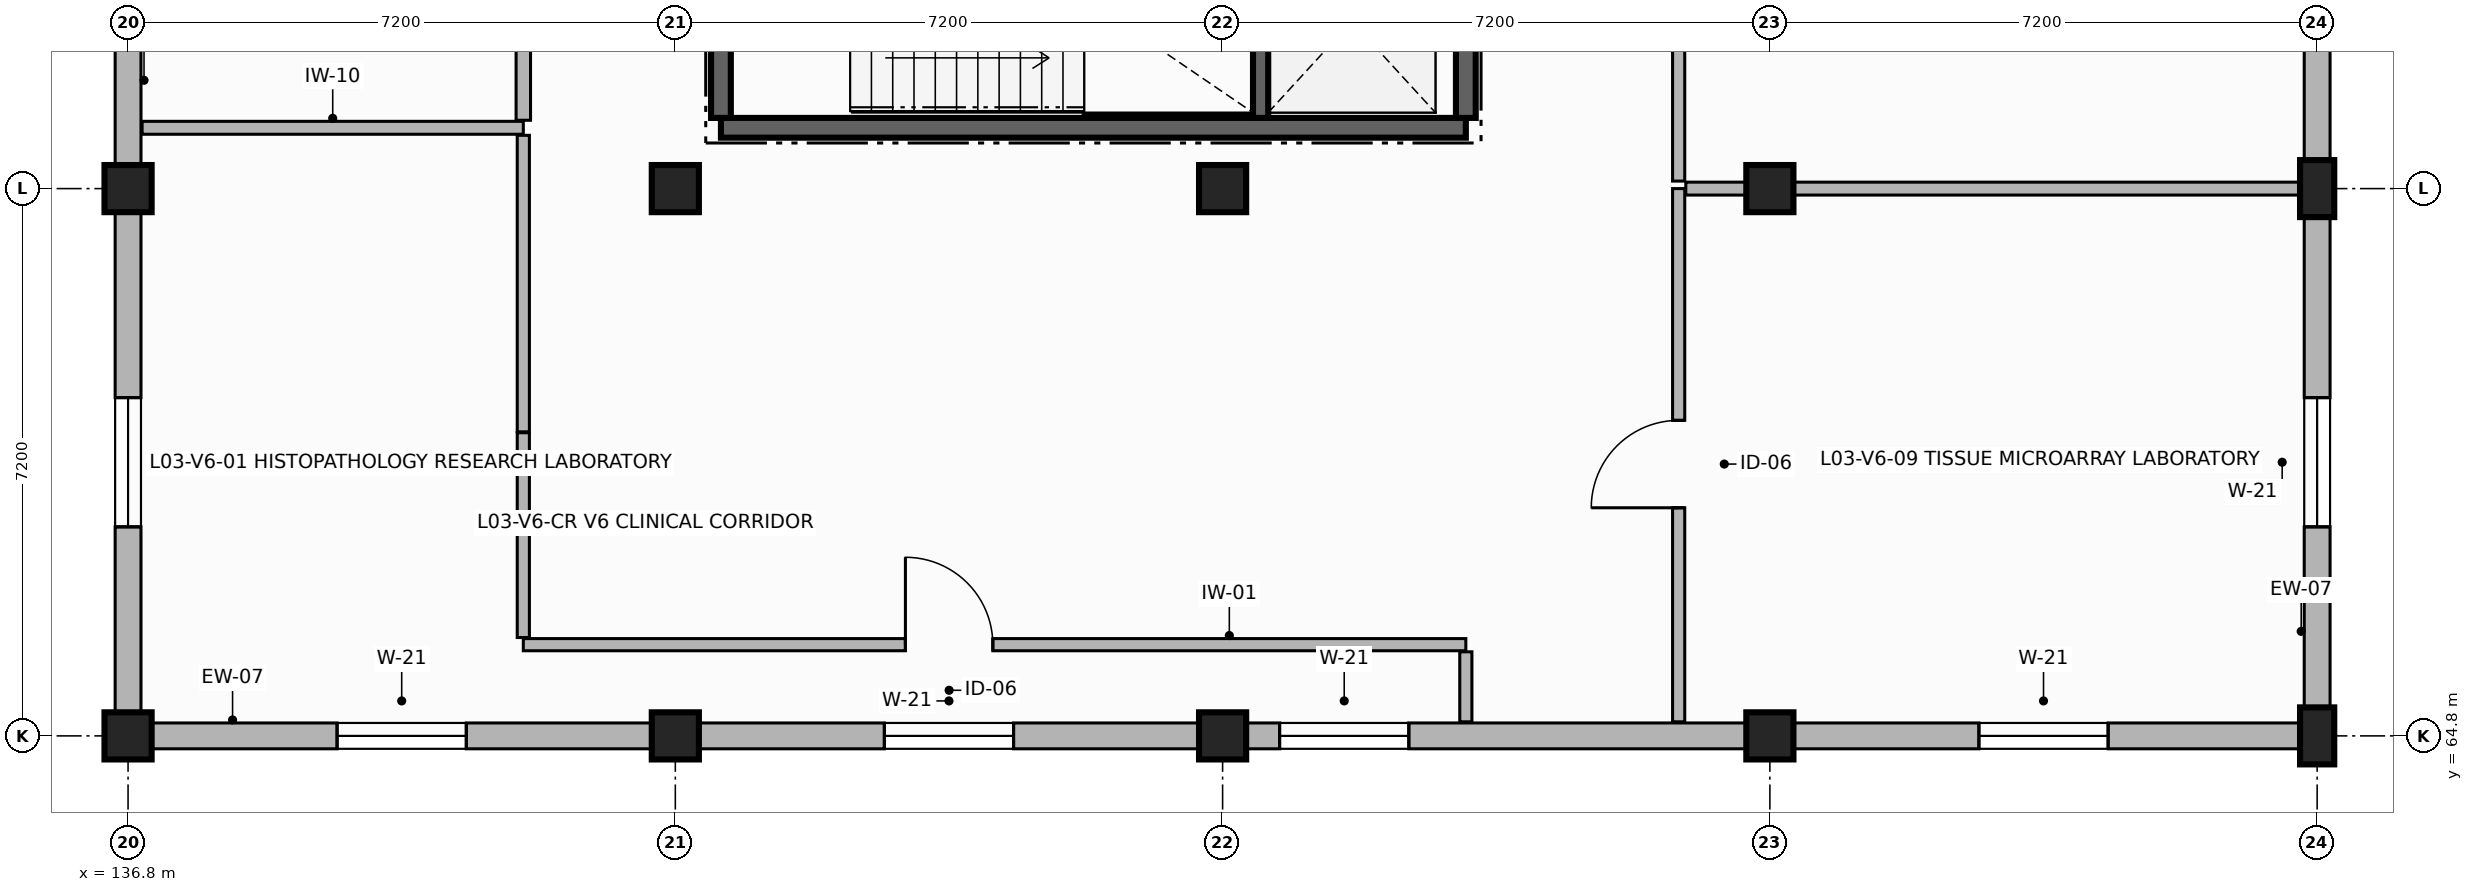
"""IFC4 building model, lengths in metres.
Left out: names, types, materials, properties, quantities, classifications, styles, units other than length and angle.
Written with IfcOpenShell. Run it as: python <this file> out.ifc"""

import sys

from ifc_helpers import new_model, si_unit, direction, frame, frame_2d, origin, origin_2d, place, context, subcontext, project, spatial, rectangle, extrude, element, fill, save


model = new_model("IFC4")
c1 = context("Model", 3, precision=1e-05, world=origin(), true_north=direction((0.0, 1.0)))
c2 = subcontext(c1, "Body", "Model", "MODEL_VIEW")
j1 = project(units=[si_unit("LENGTHUNIT", "METRE"), si_unit("PLANEANGLEUNIT", "RADIAN")], contexts=[c1])
p1 = place(None, origin())
s1 = spatial("IfcSite", under=j1, at=p1, CompositionType="ELEMENT")
p2 = place(p1, origin())
s2 = spatial("IfcBuilding", under=s1, at=p2, CompositionType="ELEMENT")
p3 = place(p2, frame((0.0, 0.0, 12.3)))
s3 = spatial("IfcBuildingStorey", under=s2, at=p3, CompositionType="ELEMENT", Elevation=12.3)
for number, where, z_axis, x_axis in (
    (1, (136.8, 64.8, 0.0), (0.0, 0.0, 1.0), (1.0, 0.0, 0.0)),
    (2, (136.8, 72.0, 0.0), (0.0, 0.0, 1.0), (1.0, 0.0, 0.0)),
    (3, (144.0, 64.8, 0.0), (0.0, 0.0, 1.0), (1.0, 0.0, 0.0)),
    (4, (144.0, 72.0, 0.0), (0.0, 0.0, 1.0), (1.0, 0.0, 0.0)),
    (5, (151.2, 64.8, 0.0), (0.0, 0.0, 1.0), (1.0, 0.0, 0.0)),
    (6, (151.2, 72.0, 0.0), (0.0, 0.0, 1.0), (1.0, 0.0, 0.0)),
    (7, (158.4, 64.8, 0.0), (0.0, 0.0, 1.0), (1.0, 0.0, 0.0)),
    (8, (158.4, 72.0, 0.0), (0.0, 0.0, 1.0), (1.0, 0.0, 0.0)),
):
    element("IfcColumn", number, at=place(p3, frame(where, z_axis=z_axis, x_axis=x_axis)), inside=s3, PredefinedType="COLUMN", context=c2, shape_type="SweptSolid", body=[
        extrude(rectangle(XDim=0.62, YDim=0.62, at=origin_2d()), origin(), (0.0, 0.0, 1.0), 3.38),
    ])
for number, where, z_axis, x_axis in (
    (9, (165.6, 64.8, 0.0), (0.0, 0.0, 1.0), (1.0, 0.0, 0.0)),
    (10, (165.6, 72.0, 0.0), (0.0, 0.0, 1.0), (1.0, 0.0, 0.0)),
):
    element("IfcColumn", number, at=place(p3, frame(where, z_axis=z_axis, x_axis=x_axis)), inside=s3, PredefinedType="PILASTER", context=c2, shape_type="SweptSolid", body=[
        extrude(rectangle(XDim=0.45, YDim=0.75, at=origin_2d()), origin(), (0.0, 0.0, 1.0), 3.38),
    ])
p4 = place(p3, frame((136.8, 64.8, 0.0), z_axis=(0.0, 0.0, 1.0), x_axis=(1.0, 0.0, 0.0)))
e11 = element("IfcWall", 11, at=p4, inside=s3, PredefinedType="SOLIDWALL", context=c2, shape_type="SweptSolid", body=[
    extrude(rectangle(XDim=7.2, YDim=0.34, at=frame_2d((3.6, 0.0))), origin(), (0.0, 0.0, 1.0), 2.71),
])
p5 = place(p4, frame((2.75, 0.0, 0.85)))
e12 = element("IfcOpeningElement", 12, at=p5, cuts=e11, PredefinedType="OPENING", context=c2, shape_type="SweptSolid", body=[
    extrude(rectangle(XDim=1.7, YDim=1.65, at=frame_2d((0.85, 0.825))), frame((0.0, 0.18, 0.0), z_axis=(0.0, -1.0, 0.0), x_axis=(1.0, 0.0, 0.0)), (0.0, 0.0, 1.0), 0.36),
])
p6 = place(p3, frame((144.0, 64.8, 0.0), z_axis=(0.0, 0.0, 1.0), x_axis=(1.0, 0.0, 0.0)))
e13 = element("IfcWall", 13, at=p6, inside=s3, PredefinedType="SOLIDWALL", context=c2, shape_type="SweptSolid", body=[
    extrude(rectangle(XDim=7.2, YDim=0.34, at=frame_2d((3.6, 0.0))), origin(), (0.0, 0.0, 1.0), 2.71),
])
p7 = place(p6, frame((2.75, 0.0, 0.85)))
e14 = element("IfcOpeningElement", 14, at=p7, cuts=e13, PredefinedType="OPENING", context=c2, shape_type="SweptSolid", body=[
    extrude(rectangle(XDim=1.7, YDim=1.65, at=frame_2d((0.85, 0.825))), frame((0.0, 0.18, 0.0), z_axis=(0.0, -1.0, 0.0), x_axis=(1.0, 0.0, 0.0)), (0.0, 0.0, 1.0), 0.36),
])
p8 = place(p3, frame((151.2, 64.8, 0.0), z_axis=(0.0, 0.0, 1.0), x_axis=(1.0, 0.0, 0.0)))
e15 = element("IfcWall", 15, at=p8, inside=s3, PredefinedType="SOLIDWALL", context=c2, shape_type="SweptSolid", body=[
    extrude(rectangle(XDim=7.2, YDim=0.34, at=frame_2d((3.6, 0.0))), origin(), (0.0, 0.0, 1.0), 2.71),
])
p9 = place(p8, frame((0.75, 0.0, 0.85)))
e16 = element("IfcOpeningElement", 16, at=p9, cuts=e15, PredefinedType="OPENING", context=c2, shape_type="SweptSolid", body=[
    extrude(rectangle(XDim=1.7, YDim=1.65, at=frame_2d((0.85, 0.825))), frame((0.0, 0.18, 0.0), z_axis=(0.0, -1.0, 0.0), x_axis=(1.0, 0.0, 0.0)), (0.0, 0.0, 1.0), 0.36),
])
p10 = place(p3, frame((158.4, 64.8, 0.0), z_axis=(0.0, 0.0, 1.0), x_axis=(1.0, 0.0, 0.0)))
e17 = element("IfcWall", 17, at=p10, inside=s3, PredefinedType="SOLIDWALL", context=c2, shape_type="SweptSolid", body=[
    extrude(rectangle(XDim=7.2, YDim=0.34, at=frame_2d((3.6, 0.0))), origin(), (0.0, 0.0, 1.0), 2.71),
])
p11 = place(p10, frame((2.75, 0.0, 0.85)))
e18 = element("IfcOpeningElement", 18, at=p11, cuts=e17, PredefinedType="OPENING", context=c2, shape_type="SweptSolid", body=[
    extrude(rectangle(XDim=1.7, YDim=1.65, at=frame_2d((0.85, 0.825))), frame((0.0, 0.18, 0.0), z_axis=(0.0, -1.0, 0.0), x_axis=(1.0, 0.0, 0.0)), (0.0, 0.0, 1.0), 0.36),
])
p12 = place(p3, frame((165.6, 64.8, 0.0), z_axis=(0.0, 0.0, 1.0), x_axis=(0.0, 1.0, 0.0)))
e19 = element("IfcWall", 19, at=p12, inside=s3, PredefinedType="SOLIDWALL", context=c2, shape_type="SweptSolid", body=[
    extrude(rectangle(XDim=7.2, YDim=0.34, at=frame_2d((3.6, 0.0))), origin(), (0.0, 0.0, 1.0), 2.71),
])
p13 = place(p12, frame((2.75, 0.0, 0.85)))
e20 = element("IfcOpeningElement", 20, at=p13, cuts=e19, PredefinedType="OPENING", context=c2, shape_type="SweptSolid", body=[
    extrude(rectangle(XDim=1.7, YDim=1.65, at=frame_2d((0.85, 0.825))), frame((0.0, 0.18, 0.0), z_axis=(0.0, -1.0, 0.0), x_axis=(1.0, 0.0, 0.0)), (0.0, 0.0, 1.0), 0.36),
])
p14 = place(p3, frame((165.6, 72.0, 0.0), z_axis=(0.0, 0.0, 1.0), x_axis=(0.0, 1.0, 0.0)))
e21 = element("IfcWall", 21, at=p14, inside=s3, PredefinedType="SOLIDWALL", context=c2, shape_type="SweptSolid", body=[
    extrude(rectangle(XDim=7.2, YDim=0.34, at=frame_2d((3.6, 0.0))), origin(), (0.0, 0.0, 1.0), 2.71),
])
p15 = place(p14, frame((2.75, 0.0, 0.85)))
e22 = element("IfcOpeningElement", 22, at=p15, cuts=e21, PredefinedType="OPENING", context=c2, shape_type="SweptSolid", body=[
    extrude(rectangle(XDim=1.7, YDim=1.65, at=frame_2d((0.85, 0.825))), frame((0.0, 0.18, 0.0), z_axis=(0.0, -1.0, 0.0), x_axis=(1.0, 0.0, 0.0)), (0.0, 0.0, 1.0), 0.36),
])
p16 = place(p3, frame((136.8, 79.2, 0.0), z_axis=(0.0, 0.0, 1.0), x_axis=(0.0, -1.0, 0.0)))
e23 = element("IfcWall", 23, at=p16, inside=s3, PredefinedType="SOLIDWALL", context=c2, shape_type="SweptSolid", body=[
    extrude(rectangle(XDim=7.2, YDim=0.34, at=frame_2d((3.6, 0.0))), origin(), (0.0, 0.0, 1.0), 2.71),
])
p17 = place(p16, frame((2.65, 0.0, 0.85)))
e24 = element("IfcOpeningElement", 24, at=p17, cuts=e23, PredefinedType="OPENING", context=c2, shape_type="SweptSolid", body=[
    extrude(rectangle(XDim=1.7, YDim=1.65, at=frame_2d((0.85, 0.825))), frame((0.0, 0.18, 0.0), z_axis=(0.0, -1.0, 0.0), x_axis=(1.0, 0.0, 0.0)), (0.0, 0.0, 1.0), 0.36),
])
p18 = place(p3, frame((136.8, 72.0, 0.0), z_axis=(0.0, 0.0, 1.0), x_axis=(0.0, -1.0, 0.0)))
e25 = element("IfcWall", 25, at=p18, inside=s3, PredefinedType="SOLIDWALL", context=c2, shape_type="SweptSolid", body=[
    extrude(rectangle(XDim=7.2, YDim=0.34, at=frame_2d((3.6, 0.0))), origin(), (0.0, 0.0, 1.0), 2.71),
])
p19 = place(p18, frame((2.75, 0.0, 0.85)))
e26 = element("IfcOpeningElement", 26, at=p19, cuts=e25, PredefinedType="OPENING", context=c2, shape_type="SweptSolid", body=[
    extrude(rectangle(XDim=1.7, YDim=1.65, at=frame_2d((0.85, 0.825))), frame((0.0, 0.18, 0.0), z_axis=(0.0, -1.0, 0.0), x_axis=(1.0, 0.0, 0.0)), (0.0, 0.0, 1.0), 0.36),
])
p20 = place(p3, frame((144.6, 72.8, 0.0), z_axis=(0.0, 0.0, 1.0), x_axis=(1.0, 0.0, 0.0)))
e27 = element("IfcWall", 27, at=p20, inside=s3, PredefinedType="SHEAR", context=c2, shape_type="SweptSolid", body=[
    extrude(rectangle(XDim=9.8, YDim=0.26, at=frame_2d((4.9, 0.0))), origin(), (0.0, 0.0, 1.0), 3.38),
])
p21 = place(p3, frame((154.4, 72.93, 0.0), z_axis=(0.0, 0.0, 1.0), x_axis=(0.0, 1.0, 0.0)))
e28 = element("IfcWall", 28, at=p21, inside=s3, PredefinedType="SHEAR", context=c2, shape_type="SweptSolid", body=[
    extrude(rectangle(XDim=5.54, YDim=0.26, at=frame_2d((2.77, 0.0))), origin(), (0.0, 0.0, 1.0), 3.38),
])
p22 = place(p21, frame((4.07, 0.0, 0.0)))
e29 = element("IfcOpeningElement", 29, at=p22, cuts=e28, PredefinedType="OPENING", context=c2, shape_type="SweptSolid", body=[
    extrude(rectangle(XDim=1.15, YDim=2.2, at=frame_2d((0.575, 1.1))), frame((0.0, 0.14, 0.0), z_axis=(0.0, -1.0, 0.0), x_axis=(1.0, 0.0, 0.0)), (0.0, 0.0, 1.0), 0.28),
])
p23 = place(p3, frame((144.6, 78.47, 0.0), z_axis=(0.0, 0.0, 1.0), x_axis=(0.0, -1.0, 0.0)))
e30 = element("IfcWall", 30, at=p23, inside=s3, PredefinedType="SHEAR", context=c2, shape_type="SweptSolid", body=[
    extrude(rectangle(XDim=5.54, YDim=0.26, at=frame_2d((2.77, 0.0))), origin(), (0.0, 0.0, 1.0), 3.38),
])
p24 = place(p3, frame((151.7, 72.93, 0.0), z_axis=(0.0, 0.0, 1.0), x_axis=(0.0, 1.0, 0.0)))
e31 = element("IfcWall", 31, at=p24, inside=s3, PredefinedType="SHEAR", context=c2, shape_type="SweptSolid", body=[
    extrude(rectangle(XDim=3.67, YDim=0.2, at=frame_2d((1.835, 0.0))), origin(), (0.0, 0.0, 1.0), 3.38),
])
p25 = place(p3, frame((142.0, 66.0, 0.0), z_axis=(0.0, 0.0, 1.0), x_axis=(1.0, 0.0, 0.0)))
e32 = element("IfcWall", 32, at=p25, inside=s3, PredefinedType="PARTITIONING", context=c2, shape_type="SweptSolid", body=[
    extrude(rectangle(XDim=12.4, YDim=0.16, at=frame_2d((6.2, 0.0))), origin(), (0.0, 0.0, 1.0), 2.69),
])
p26 = place(p25, frame((5.027, 0.0, 0.0)))
e33 = element("IfcOpeningElement", 33, at=p26, cuts=e32, PredefinedType="OPENING", context=c2, shape_type="SweptSolid", body=[
    extrude(rectangle(XDim=1.15, YDim=2.25, at=frame_2d((0.575, 1.125))), frame((0.0, 0.09, 0.0), z_axis=(0.0, -1.0, 0.0), x_axis=(1.0, 0.0, 0.0)), (0.0, 0.0, 1.0), 0.18),
])
p27 = place(p3, frame((154.4, 65.906, 0.0), z_axis=(0.0, 0.0, 1.0), x_axis=(0.0, -1.0, 0.0)))
e34 = element("IfcWall", 34, at=p27, inside=s3, PredefinedType="PARTITIONING", context=c2, shape_type="SweptSolid", body=[
    extrude(rectangle(XDim=0.921, YDim=0.16, at=frame_2d((0.46, 0.0))), origin(), (0.0, 0.0, 1.0), 2.69),
])
p28 = place(p3, frame((136.985, 72.8, 0.0), z_axis=(0.0, 0.0, 1.0), x_axis=(1.0, 0.0, 0.0)))
e35 = element("IfcWall", 35, at=p28, inside=s3, PredefinedType="PARTITIONING", context=c2, shape_type="SweptSolid", body=[
    extrude(rectangle(XDim=5.015, YDim=0.17, at=frame_2d((2.507, 0.0))), origin(), (0.0, 0.0, 1.0), 2.69),
])
p29 = place(p3, frame((142.0, 72.701, 0.0), z_axis=(0.0, 0.0, 1.0), x_axis=(0.0, -1.0, 0.0)))
e36 = element("IfcWall", 36, at=p29, inside=s3, PredefinedType="PARTITIONING", context=c2, shape_type="SweptSolid", body=[
    extrude(rectangle(XDim=3.901, YDim=0.16, at=frame_2d((1.95, 0.0))), origin(), (0.0, 0.0, 1.0), 2.69),
])
p30 = place(p3, frame((142.0, 68.788, 0.0), z_axis=(0.0, 0.0, 1.0), x_axis=(0.0, -1.0, 0.0)))
e37 = element("IfcWall", 37, at=p30, inside=s3, PredefinedType="PARTITIONING", context=c2, shape_type="SweptSolid", body=[
    extrude(rectangle(XDim=2.694, YDim=0.16, at=frame_2d((1.347, 0.0))), origin(), (0.0, 0.0, 1.0), 2.69),
])
p31 = place(p3, frame((142.0, 78.491, 0.0), z_axis=(0.0, 0.0, 1.0), x_axis=(0.0, -1.0, 0.0)))
e38 = element("IfcWall", 38, at=p31, inside=s3, PredefinedType="PARTITIONING", context=c2, shape_type="SweptSolid", body=[
    extrude(rectangle(XDim=5.592, YDim=0.19, at=frame_2d((2.796, 0.0))), origin(), (0.0, 0.0, 1.0), 2.69),
])
p32 = place(p31, frame((2.337, 0.0, 0.0)))
e39 = element("IfcOpeningElement", 39, at=p32, cuts=e38, PredefinedType="OPENING", context=c2, shape_type="SweptSolid", body=[
    extrude(rectangle(XDim=1.15, YDim=2.25, at=frame_2d((0.575, 1.125))), frame((0.0, 0.105, 0.0), z_axis=(0.0, -1.0, 0.0), x_axis=(1.0, 0.0, 0.0)), (0.0, 0.0, 1.0), 0.21),
])
p33 = place(p3, frame((157.2, 64.985, 0.0), z_axis=(0.0, 0.0, 1.0), x_axis=(0.0, 1.0, 0.0)))
e40 = element("IfcWall", 40, at=p33, inside=s3, PredefinedType="PARTITIONING", context=c2, shape_type="SweptSolid", body=[
    extrude(rectangle(XDim=7.015, YDim=0.16, at=frame_2d((3.507, 0.0))), origin(), (0.0, 0.0, 1.0), 2.69),
])
p34 = place(p33, frame((2.816, 0.0, 0.0)))
e41 = element("IfcOpeningElement", 41, at=p34, cuts=e40, PredefinedType="OPENING", context=c2, shape_type="SweptSolid", body=[
    extrude(rectangle(XDim=1.15, YDim=2.25, at=frame_2d((0.575, 1.125))), frame((0.0, 0.09, 0.0), z_axis=(0.0, -1.0, 0.0), x_axis=(1.0, 0.0, 0.0)), (0.0, 0.0, 1.0), 0.18),
])
p35 = place(p3, frame((157.294, 72.0, 0.0), z_axis=(0.0, 0.0, 1.0), x_axis=(1.0, 0.0, 0.0)))
e42 = element("IfcWall", 42, at=p35, inside=s3, PredefinedType="PARTITIONING", context=c2, shape_type="SweptSolid", body=[
    extrude(rectangle(XDim=8.121, YDim=0.17, at=frame_2d((4.061, 0.0))), origin(), (0.0, 0.0, 1.0), 2.69),
])
p36 = place(p3, frame((157.2, 72.099, 0.0), z_axis=(0.0, 0.0, 1.0), x_axis=(0.0, 1.0, 0.0)))
e43 = element("IfcWall", 43, at=p36, inside=s3, PredefinedType="PARTITIONING", context=c2, shape_type="SweptSolid", body=[
    extrude(rectangle(XDim=14.301, YDim=0.16, at=frame_2d((7.15, 0.0))), origin(), (0.0, 0.0, 1.0), 2.69),
])
p37 = place(p36, frame((10.175, 0.0, 0.0)))
e44 = element("IfcOpeningElement", 44, at=p37, cuts=e43, PredefinedType="OPENING", context=c2, shape_type="SweptSolid", body=[
    extrude(rectangle(XDim=0.98, YDim=2.15, at=frame_2d((0.49, 1.075))), frame((0.0, 0.09, 0.0), z_axis=(0.0, -1.0, 0.0), x_axis=(1.0, 0.0, 0.0)), (0.0, 0.0, 1.0), 0.18),
])
p38 = place(p5, origin())
e45 = element("IfcWindow", 45, at=p38, inside=s3, PartitioningType="SINGLE_PANEL", PredefinedType="WINDOW", context=c2, shape_type="SweptSolid", body=[
    extrude(rectangle(XDim=1.7, YDim=1.65, at=frame_2d((0.85, 0.825))), frame((0.0, 0.03, 0.0), z_axis=(0.0, -1.0, 0.0), x_axis=(1.0, 0.0, 0.0)), (0.0, 0.0, 1.0), 0.06),
])
fill(e12, e45)
p39 = place(p7, origin())
e46 = element("IfcWindow", 46, at=p39, inside=s3, PartitioningType="SINGLE_PANEL", PredefinedType="WINDOW", context=c2, shape_type="SweptSolid", body=[
    extrude(rectangle(XDim=1.7, YDim=1.65, at=frame_2d((0.85, 0.825))), frame((0.0, 0.03, 0.0), z_axis=(0.0, -1.0, 0.0), x_axis=(1.0, 0.0, 0.0)), (0.0, 0.0, 1.0), 0.06),
])
fill(e14, e46)
p40 = place(p9, origin())
e47 = element("IfcWindow", 47, at=p40, inside=s3, PartitioningType="SINGLE_PANEL", PredefinedType="WINDOW", context=c2, shape_type="SweptSolid", body=[
    extrude(rectangle(XDim=1.7, YDim=1.65, at=frame_2d((0.85, 0.825))), frame((0.0, 0.03, 0.0), z_axis=(0.0, -1.0, 0.0), x_axis=(1.0, 0.0, 0.0)), (0.0, 0.0, 1.0), 0.06),
])
fill(e16, e47)
p41 = place(p11, origin())
e48 = element("IfcWindow", 48, at=p41, inside=s3, PartitioningType="SINGLE_PANEL", PredefinedType="WINDOW", context=c2, shape_type="SweptSolid", body=[
    extrude(rectangle(XDim=1.7, YDim=1.65, at=frame_2d((0.85, 0.825))), frame((0.0, 0.03, 0.0), z_axis=(0.0, -1.0, 0.0), x_axis=(1.0, 0.0, 0.0)), (0.0, 0.0, 1.0), 0.06),
])
fill(e18, e48)
p42 = place(p13, origin())
e49 = element("IfcWindow", 49, at=p42, inside=s3, PartitioningType="SINGLE_PANEL", PredefinedType="WINDOW", context=c2, shape_type="SweptSolid", body=[
    extrude(rectangle(XDim=1.7, YDim=1.65, at=frame_2d((0.85, 0.825))), frame((0.0, 0.03, 0.0), z_axis=(0.0, -1.0, 0.0), x_axis=(1.0, 0.0, 0.0)), (0.0, 0.0, 1.0), 0.06),
])
fill(e20, e49)
p43 = place(p19, origin())
e50 = element("IfcWindow", 50, at=p43, inside=s3, PartitioningType="SINGLE_PANEL", PredefinedType="WINDOW", context=c2, shape_type="SweptSolid", body=[
    extrude(rectangle(XDim=1.7, YDim=1.65, at=frame_2d((0.85, 0.825))), frame((0.0, 0.03, 0.0), z_axis=(0.0, -1.0, 0.0), x_axis=(1.0, 0.0, 0.0)), (0.0, 0.0, 1.0), 0.06),
])
fill(e26, e50)
p44 = place(p26, origin())
e51 = element("IfcDoor", 51, at=p44, inside=s3, OperationType="SINGLE_SWING_LEFT", PredefinedType="DOOR", context=c2, shape_type="SweptSolid", body=[
    extrude(rectangle(XDim=1.15, YDim=2.25, at=frame_2d((0.575, 1.125))), frame((0.0, 0.025, 0.0), z_axis=(0.0, -1.0, 0.0), x_axis=(1.0, 0.0, 0.0)), (0.0, 0.0, 1.0), 0.05),
])
fill(e33, e51)
p45 = place(p34, origin())
e52 = element("IfcDoor", 52, at=p45, inside=s3, OperationType="SINGLE_SWING_LEFT", PredefinedType="DOOR", context=c2, shape_type="SweptSolid", body=[
    extrude(rectangle(XDim=1.15, YDim=2.25, at=frame_2d((0.575, 1.125))), frame((0.0, 0.025, 0.0), z_axis=(0.0, -1.0, 0.0), x_axis=(1.0, 0.0, 0.0)), (0.0, 0.0, 1.0), 0.05),
])
fill(e41, e52)
save(model, sys.argv[1])
